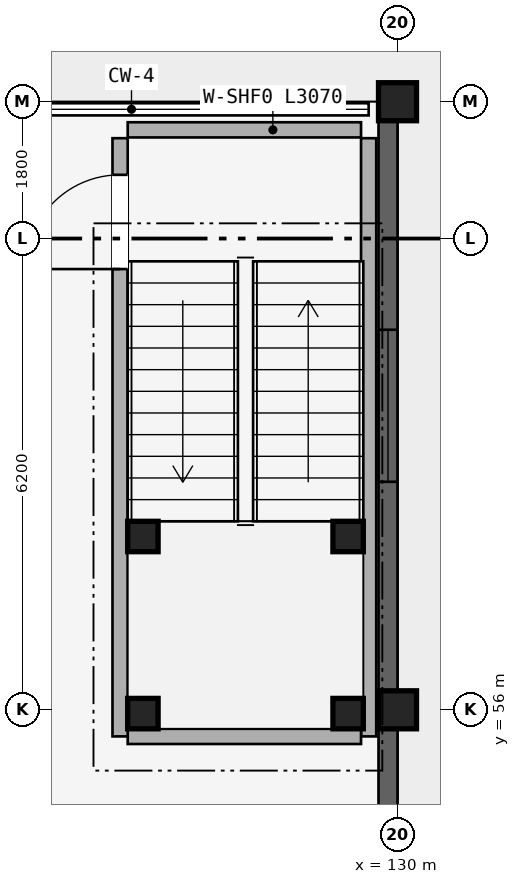
"""IFC4 building model, lengths in metres.
Left out: names, types, materials, properties, quantities, classifications, styles, units other than length and angle.
Written with IfcOpenShell. Run it as: python <this file> out.ifc"""

import sys

from ifc_helpers import new_model, si_unit, direction, frame, frame_2d, origin, origin_2d, place, context, subcontext, project, spatial, rectangle, extrude, element, fill, save


model = new_model("IFC4")
c1 = context("Model", 3, precision=1e-05, world=origin(), true_north=direction((0.0, 1.0)))
c2 = subcontext(c1, "Body", "Model", "MODEL_VIEW")
j1 = project(units=[si_unit("LENGTHUNIT", "METRE"), si_unit("PLANEANGLEUNIT", "RADIAN")], contexts=[c1])
p1 = place(None, origin())
s1 = spatial("IfcSite", under=j1, at=p1, CompositionType="ELEMENT")
p2 = place(p1, origin())
s2 = spatial("IfcBuilding", under=s1, at=p2, CompositionType="ELEMENT")
p3 = place(p2, origin())
s3 = spatial("IfcBuildingStorey", under=s2, at=p3, CompositionType="ELEMENT", Elevation=0.0)
for number, where, z_axis, x_axis in (
    (1, (130.0, 56.0, 0.0), (0.0, 0.0, 1.0), (1.0, 0.0, 0.0)),
    (2, (130.0, 64.0, 0.0), (0.0, 0.0, 1.0), (1.0, 0.0, 0.0)),
):
    element("IfcColumn", number, at=place(p3, frame(where, z_axis=z_axis, x_axis=x_axis)), inside=s3, PredefinedType="COLUMN", context=c2, shape_type="SweptSolid", body=[
        extrude(rectangle(XDim=0.5, YDim=0.5, at=origin_2d()), origin(), (0.0, 0.0, 1.0), 4.28),
    ])
for number, where, z_axis, x_axis in (
    (3, (126.65, 55.95, 0.0), (0.0, 0.0, 1.0), (1.0, 0.0, 0.0)),
    (4, (129.35, 55.95, 0.0), (0.0, 0.0, 1.0), (1.0, 0.0, 0.0)),
    (5, (126.65, 58.28, 0.0), (0.0, 0.0, 1.0), (1.0, 0.0, 0.0)),
    (6, (129.35, 58.28, 0.0), (0.0, 0.0, 1.0), (1.0, 0.0, 0.0)),
):
    element("IfcColumn", number, at=place(p3, frame(where, z_axis=z_axis, x_axis=x_axis)), inside=s3, PredefinedType="COLUMN", context=c2, shape_type="SweptSolid", body=[
        extrude(rectangle(XDim=0.4, YDim=0.4, at=origin_2d()), origin(), (0.0, 0.0, 1.0), 2.05),
    ])
p4 = place(p3, frame((129.62, 55.65, 0.0), z_axis=(0.0, 0.0, 1.0), x_axis=(0.0, 1.0, 0.0)))
e7 = element("IfcWall", 7, at=p4, inside=s3, PredefinedType="STANDARD", context=c2, shape_type="SweptSolid", body=[
    extrude(rectangle(XDim=7.87, YDim=0.2, at=frame_2d((3.935, 0.0))), origin(), (0.0, 0.0, 1.0), 4.24),
])
for number, where, z_axis, x_axis in (
    (8, (126.45, 63.63, 0.0), (0.0, 0.0, 1.0), (1.0, 0.0, 0.0)),
    (9, (126.45, 55.65, 0.0), (0.0, 0.0, 1.0), (1.0, 0.0, 0.0)),
):
    element("IfcWall", number, at=place(p3, frame(where, z_axis=z_axis, x_axis=x_axis)), inside=s3, PredefinedType="STANDARD", context=c2, shape_type="SweptSolid", body=[
        extrude(rectangle(XDim=3.07, YDim=0.2, at=frame_2d((1.535, 0.0))), origin(), (0.0, 0.0, 1.0), 4.24),
    ])
p5 = place(p3, frame((126.35, 55.65, 0.0), z_axis=(0.0, 0.0, 1.0), x_axis=(0.0, 1.0, 0.0)))
e10 = element("IfcWall", 10, at=p5, inside=s3, PredefinedType="STANDARD", context=c2, shape_type="SweptSolid", body=[
    extrude(rectangle(XDim=7.87, YDim=0.2, at=frame_2d((3.935, 0.0))), origin(), (0.0, 0.0, 1.0), 4.24),
])
p6 = place(p5, frame((6.148, 0.0, 0.0)))
e11 = element("IfcOpeningElement", 11, at=p6, cuts=e10, PredefinedType="OPENING", context=c2, shape_type="SweptSolid", body=[
    extrude(rectangle(XDim=1.24, YDim=2.15, at=frame_2d((0.62, 1.075))), frame((0.0, 0.11, 0.0), z_axis=(0.0, -1.0, 0.0), x_axis=(1.0, 0.0, 0.0)), (0.0, 0.0, 1.0), 0.22),
])
p7 = place(p3, frame((129.875, 48.253, 0.0), z_axis=(0.0, 0.0, 1.0), x_axis=(0.0, 1.0, 0.0)))
e12 = element("IfcWall", 12, at=p7, inside=s3, PredefinedType="STANDARD", context=c2, shape_type="SweptSolid", body=[
    extrude(rectangle(XDim=7.493, YDim=0.25, at=frame_2d((3.747, 0.0))), origin(), (0.0, 0.0, 1.0), 3.672),
])
p8 = place(p7, frame((2.747, 0.0, 0.88)))
e13 = element("IfcOpeningElement", 13, at=p8, cuts=e12, PredefinedType="OPENING", context=c2, shape_type="SweptSolid", body=[
    extrude(rectangle(XDim=2.0, YDim=1.95, at=frame_2d((1.0, 0.975))), frame((0.0, 0.135, 0.0), z_axis=(0.0, -1.0, 0.0), x_axis=(1.0, 0.0, 0.0)), (0.0, 0.0, 1.0), 0.27),
])
p9 = place(p3, frame((129.875, 56.253, 0.0), z_axis=(0.0, 0.0, 1.0), x_axis=(0.0, 1.0, 0.0)))
e14 = element("IfcWall", 14, at=p9, inside=s3, PredefinedType="STANDARD", context=c2, shape_type="SweptSolid", body=[
    extrude(rectangle(XDim=7.493, YDim=0.25, at=frame_2d((3.747, 0.0))), origin(), (0.0, 0.0, 1.0), 3.672),
])
p10 = place(p9, frame((2.747, 0.0, 0.88)))
e15 = element("IfcOpeningElement", 15, at=p10, cuts=e14, PredefinedType="OPENING", context=c2, shape_type="SweptSolid", body=[
    extrude(rectangle(XDim=2.0, YDim=1.95, at=frame_2d((1.0, 0.975))), frame((0.0, 0.135, 0.0), z_axis=(0.0, -1.0, 0.0), x_axis=(1.0, 0.0, 0.0)), (0.0, 0.0, 1.0), 0.27),
])
p11 = place(p10, origin())
e16 = element("IfcWindow", 16, at=p11, inside=s3, PartitioningType="TRIPLE_PANEL_VERTICAL", PredefinedType="WINDOW", context=c2, shape_type="SweptSolid", body=[
    extrude(rectangle(XDim=2.0, YDim=1.95, at=frame_2d((1.0, 0.975))), frame((0.0, 0.03, 0.0), z_axis=(0.0, -1.0, 0.0), x_axis=(1.0, 0.0, 0.0)), (0.0, 0.0, 1.0), 0.06),
])
fill(e15, e16)
p12 = place(p6, frame((1.24, 0.0, 0.0), z_axis=(0.0, 0.0, 1.0), x_axis=(-1.0, 0.0, 0.0)))
e17 = element("IfcDoor", 17, at=p12, inside=s3, OperationType="SINGLE_SWING_RIGHT", PredefinedType="DOOR", context=c2, shape_type="SweptSolid", body=[
    extrude(rectangle(XDim=1.24, YDim=2.15, at=frame_2d((0.62, 1.075))), frame((0.0, 0.025, 0.0), z_axis=(0.0, -1.0, 0.0), x_axis=(1.0, 0.0, 0.0)), (0.0, 0.0, 1.0), 0.05),
])
fill(e11, e17)
save(model, sys.argv[1])
